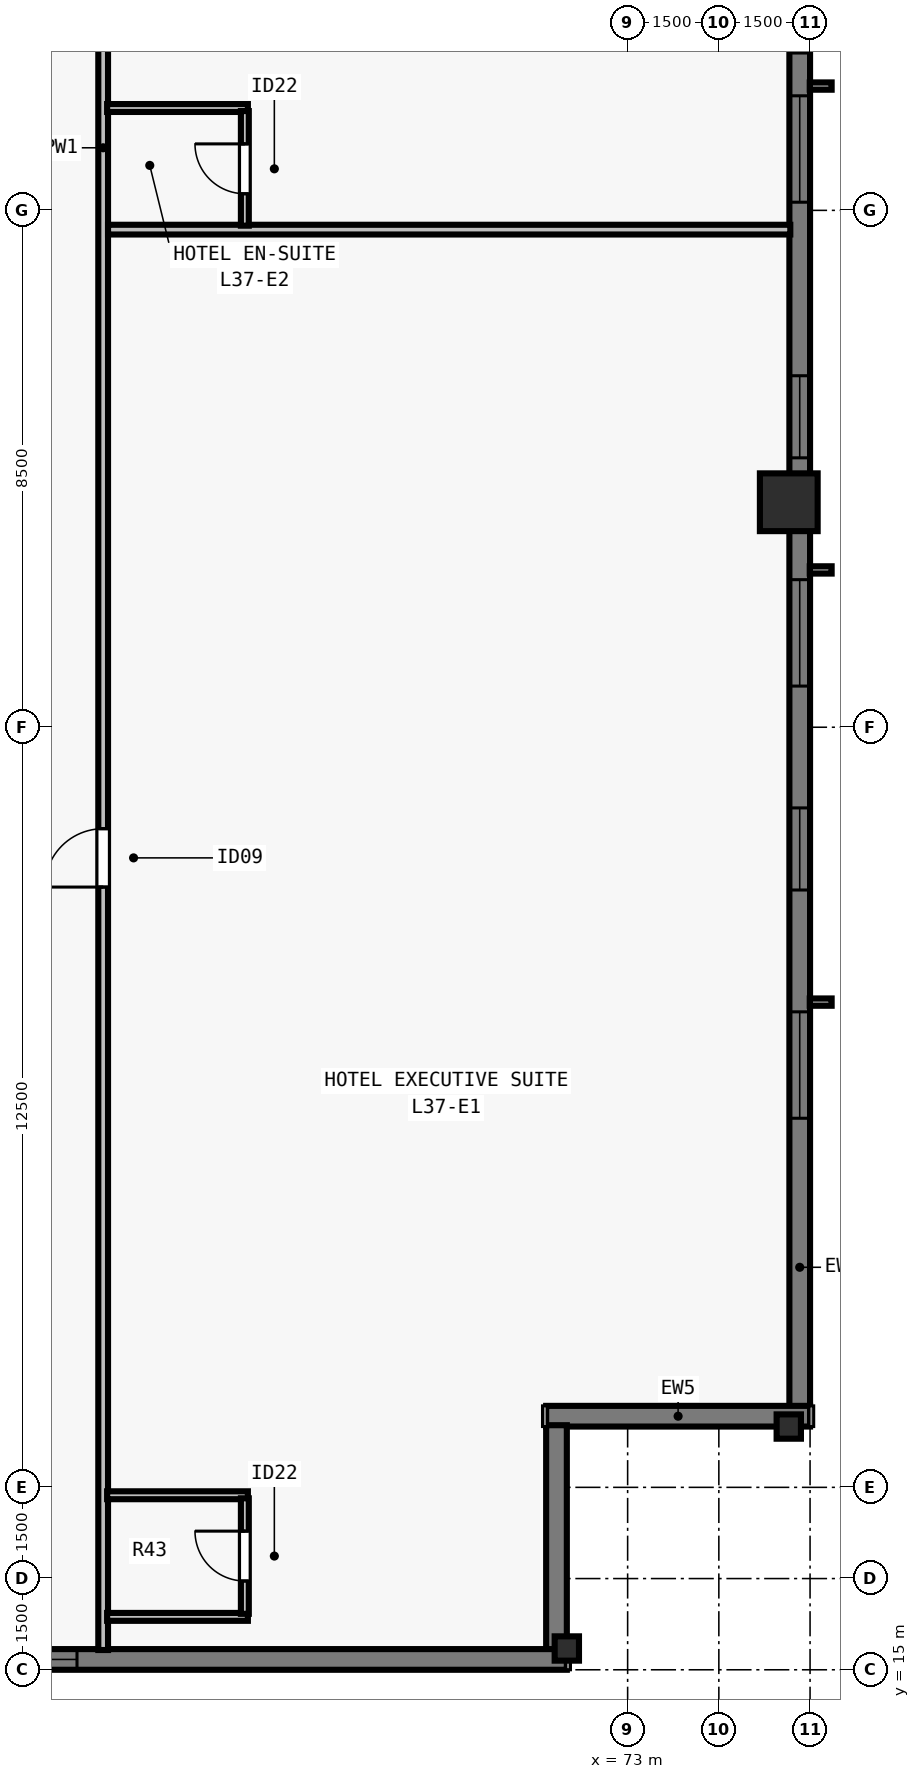
"""IFC4 building model, lengths in metres.
Left out: names, types, materials, properties, quantities, classifications, styles, units other than length and angle.
Written with IfcOpenShell. Run it as: python <this file> out.ifc"""

import sys

from ifc_helpers import new_model, si_unit, direction, frame, frame_2d, origin, origin_2d, place, context, subcontext, project, spatial, rectangle, i_section, extrude, element, fill, save


model = new_model("IFC4")
c1 = context("Model", 3, precision=1e-05, world=origin(), true_north=direction((0.0, 1.0)))
c2 = subcontext(c1, "Body", "Model", "MODEL_VIEW")
j1 = project(units=[si_unit("LENGTHUNIT", "METRE"), si_unit("PLANEANGLEUNIT", "RADIAN")], contexts=[c1])
p1 = place(None, origin())
s1 = spatial("IfcSite", under=j1, at=p1, CompositionType="ELEMENT")
p2 = place(p1, origin())
s2 = spatial("IfcBuilding", under=s1, at=p2, CompositionType="ELEMENT")
p3 = place(p2, frame((0.0, 0.0, 137.5)))
s3 = spatial("IfcBuildingStorey", under=s2, at=p3, CompositionType="ELEMENT", Elevation=137.5)
for number, where, z_axis, x_axis in (
    (1, (72.0, 15.35, 0.0), (0.0, 0.0, 1.0), (1.0, 0.0, 0.0)),
    (2, (75.65, 19.0, 0.0), (0.0, 0.0, 1.0), (0.0, 1.0, 0.0)),
):
    element("IfcColumn", number, at=place(p3, frame(where, z_axis=z_axis, x_axis=x_axis)), inside=s3, PredefinedType="COLUMN", context=c2, shape_type="SweptSolid", body=[
        extrude(i_section(OverallWidth=0.4, OverallDepth=0.4, WebThickness=0.022, FlangeThickness=0.036, at=origin_2d()), origin(), (0.0, 0.0, 1.0), 3.5),
    ])
p4 = place(p3, frame((75.65, 34.2, 0.0), z_axis=(0.0, 0.0, 1.0), x_axis=(0.0, 1.0, 0.0)))
e3 = element("IfcColumn", 3, at=p4, inside=s3, PredefinedType="COLUMN", context=c2, shape_type="SweptSolid", body=[
    extrude(rectangle(XDim=0.95, YDim=0.95, at=origin_2d()), origin(), (0.0, 0.0, 1.0), 3.5),
])
p5 = place(p3, frame((75.83, 59.0, 0.0), z_axis=(0.0, 0.0, 1.0), x_axis=(0.0, -1.0, 0.0)))
e4 = element("IfcWall", 4, at=p5, inside=s3, PredefinedType="SOLIDWALL", context=c2, shape_type="SweptSolid", body=[
    extrude(rectangle(XDim=39.682, YDim=0.34, at=frame_2d((19.841, 0.0))), origin(), (0.0, 0.0, 1.0), 3.28),
])
p6 = place(p5, frame((4.752, 0.0, 0.8)))
e5 = element("IfcOpeningElement", 5, at=p6, cuts=e4, PredefinedType="OPENING", context=c2, shape_type="SweptSolid", body=[
    extrude(rectangle(XDim=1.75, YDim=1.66, at=frame_2d((0.875, 0.83))), frame((0.0, 0.18, 0.0), z_axis=(0.0, -1.0, 0.0), x_axis=(1.0, 0.0, 0.0)), (0.0, 0.0, 1.0), 0.36),
])
p7 = place(p5, frame((8.505, 0.0, 0.8)))
e6 = element("IfcOpeningElement", 6, at=p7, cuts=e4, PredefinedType="OPENING", context=c2, shape_type="SweptSolid", body=[
    extrude(rectangle(XDim=1.35, YDim=1.66, at=frame_2d((0.675, 0.83))), frame((0.0, 0.18, 0.0), z_axis=(0.0, -1.0, 0.0), x_axis=(1.0, 0.0, 0.0)), (0.0, 0.0, 1.0), 0.36),
])
p8 = place(p5, frame((11.859, 0.0, 0.8)))
e7 = element("IfcOpeningElement", 7, at=p8, cuts=e4, PredefinedType="OPENING", context=c2, shape_type="SweptSolid", body=[
    extrude(rectangle(XDim=1.75, YDim=1.66, at=frame_2d((0.875, 0.83))), frame((0.0, 0.18, 0.0), z_axis=(0.0, -1.0, 0.0), x_axis=(1.0, 0.0, 0.0)), (0.0, 0.0, 1.0), 0.36),
])
p9 = place(p5, frame((16.062, 0.0, 0.8)))
e8 = element("IfcOpeningElement", 8, at=p9, cuts=e4, PredefinedType="OPENING", context=c2, shape_type="SweptSolid", body=[
    extrude(rectangle(XDim=1.35, YDim=1.66, at=frame_2d((0.675, 0.83))), frame((0.0, 0.18, 0.0), z_axis=(0.0, -1.0, 0.0), x_axis=(1.0, 0.0, 0.0)), (0.0, 0.0, 1.0), 0.36),
])
p10 = place(p5, frame((18.116, 0.0, 0.8)))
e9 = element("IfcOpeningElement", 9, at=p10, cuts=e4, PredefinedType="OPENING", context=c2, shape_type="SweptSolid", body=[
    extrude(rectangle(XDim=1.75, YDim=1.66, at=frame_2d((0.875, 0.83))), frame((0.0, 0.18, 0.0), z_axis=(0.0, -1.0, 0.0), x_axis=(1.0, 0.0, 0.0)), (0.0, 0.0, 1.0), 0.36),
])
p11 = place(p5, frame((22.719, 0.0, 0.8)))
e10 = element("IfcOpeningElement", 10, at=p11, cuts=e4, PredefinedType="OPENING", context=c2, shape_type="SweptSolid", body=[
    extrude(rectangle(XDim=1.35, YDim=1.66, at=frame_2d((0.675, 0.83))), frame((0.0, 0.18, 0.0), z_axis=(0.0, -1.0, 0.0), x_axis=(1.0, 0.0, 0.0)), (0.0, 0.0, 1.0), 0.36),
])
p12 = place(p5, frame((26.073, 0.0, 0.8)))
e11 = element("IfcOpeningElement", 11, at=p12, cuts=e4, PredefinedType="OPENING", context=c2, shape_type="SweptSolid", body=[
    extrude(rectangle(XDim=1.75, YDim=1.66, at=frame_2d((0.875, 0.83))), frame((0.0, 0.18, 0.0), z_axis=(0.0, -1.0, 0.0), x_axis=(1.0, 0.0, 0.0)), (0.0, 0.0, 1.0), 0.36),
])
p13 = place(p5, frame((29.827, 0.0, 0.8)))
e12 = element("IfcOpeningElement", 12, at=p13, cuts=e4, PredefinedType="OPENING", context=c2, shape_type="SweptSolid", body=[
    extrude(rectangle(XDim=1.35, YDim=1.66, at=frame_2d((0.675, 0.83))), frame((0.0, 0.18, 0.0), z_axis=(0.0, -1.0, 0.0), x_axis=(1.0, 0.0, 0.0)), (0.0, 0.0, 1.0), 0.36),
])
p14 = place(p5, frame((33.18, 0.0, 0.8)))
e13 = element("IfcOpeningElement", 13, at=p14, cuts=e4, PredefinedType="OPENING", context=c2, shape_type="SweptSolid", body=[
    extrude(rectangle(XDim=1.75, YDim=1.66, at=frame_2d((0.875, 0.83))), frame((0.0, 0.18, 0.0), z_axis=(0.0, -1.0, 0.0), x_axis=(1.0, 0.0, 0.0)), (0.0, 0.0, 1.0), 0.36),
])
p15 = place(p3, frame((76.0, 19.17, 0.0), z_axis=(0.0, 0.0, 1.0), x_axis=(-1.0, 0.0, 0.0)))
e14 = element("IfcWall", 14, at=p15, inside=s3, PredefinedType="SOLIDWALL", context=c2, shape_type="SweptSolid", body=[
    extrude(rectangle(XDim=4.34, YDim=0.34, at=frame_2d((2.17, 0.0))), origin(), (0.0, 0.0, 1.0), 3.28),
])
p16 = place(p3, frame((71.83, 19.022, 0.0), z_axis=(0.0, 0.0, 1.0), x_axis=(0.0, -1.0, 0.0)))
e15 = element("IfcWall", 15, at=p16, inside=s3, PredefinedType="SOLIDWALL", context=c2, shape_type="SweptSolid", body=[
    extrude(rectangle(XDim=3.704, YDim=0.34, at=frame_2d((1.852, 0.0))), origin(), (0.0, 0.0, 1.0), 3.28),
])
p17 = place(p3, frame((72.0, 15.17, 0.0), z_axis=(0.0, 0.0, 1.0), x_axis=(-1.0, 0.0, 0.0)))
e16 = element("IfcWall", 16, at=p17, inside=s3, PredefinedType="SOLIDWALL", context=c2, shape_type="SweptSolid", body=[
    extrude(rectangle(XDim=39.682, YDim=0.34, at=frame_2d((19.841, 0.0))), origin(), (0.0, 0.0, 1.0), 3.28),
])
p18 = place(p17, frame((8.055, 0.0, 0.8)))
e17 = element("IfcOpeningElement", 17, at=p18, cuts=e16, PredefinedType="OPENING", context=c2, shape_type="SweptSolid", body=[
    extrude(rectangle(XDim=1.35, YDim=1.66, at=frame_2d((0.675, 0.83))), frame((0.0, 0.18, 0.0), z_axis=(0.0, -1.0, 0.0), x_axis=(1.0, 0.0, 0.0)), (0.0, 0.0, 1.0), 0.36),
])
p19 = place(p17, frame((11.859, 0.0, 0.8)))
e18 = element("IfcOpeningElement", 18, at=p19, cuts=e16, PredefinedType="OPENING", context=c2, shape_type="SweptSolid", body=[
    extrude(rectangle(XDim=1.75, YDim=1.66, at=frame_2d((0.875, 0.83))), frame((0.0, 0.18, 0.0), z_axis=(0.0, -1.0, 0.0), x_axis=(1.0, 0.0, 0.0)), (0.0, 0.0, 1.0), 0.36),
])
p20 = place(p17, frame((16.062, 0.0, 0.8)))
e19 = element("IfcOpeningElement", 19, at=p20, cuts=e16, PredefinedType="OPENING", context=c2, shape_type="SweptSolid", body=[
    extrude(rectangle(XDim=1.35, YDim=1.66, at=frame_2d((0.675, 0.83))), frame((0.0, 0.18, 0.0), z_axis=(0.0, -1.0, 0.0), x_axis=(1.0, 0.0, 0.0)), (0.0, 0.0, 1.0), 0.36),
])
p21 = place(p17, frame((18.966, 0.0, 0.8)))
e20 = element("IfcOpeningElement", 20, at=p21, cuts=e16, PredefinedType="OPENING", context=c2, shape_type="SweptSolid", body=[
    extrude(rectangle(XDim=1.75, YDim=1.66, at=frame_2d((0.875, 0.83))), frame((0.0, 0.18, 0.0), z_axis=(0.0, -1.0, 0.0), x_axis=(1.0, 0.0, 0.0)), (0.0, 0.0, 1.0), 0.36),
])
p22 = place(p17, frame((22.719, 0.0, 0.8)))
e21 = element("IfcOpeningElement", 21, at=p22, cuts=e16, PredefinedType="OPENING", context=c2, shape_type="SweptSolid", body=[
    extrude(rectangle(XDim=1.35, YDim=1.66, at=frame_2d((0.675, 0.83))), frame((0.0, 0.18, 0.0), z_axis=(0.0, -1.0, 0.0), x_axis=(1.0, 0.0, 0.0)), (0.0, 0.0, 1.0), 0.36),
])
p23 = place(p17, frame((26.523, 0.0, 0.8)))
e22 = element("IfcOpeningElement", 22, at=p23, cuts=e16, PredefinedType="OPENING", context=c2, shape_type="SweptSolid", body=[
    extrude(rectangle(XDim=1.75, YDim=1.66, at=frame_2d((0.875, 0.83))), frame((0.0, 0.18, 0.0), z_axis=(0.0, -1.0, 0.0), x_axis=(1.0, 0.0, 0.0)), (0.0, 0.0, 1.0), 0.36),
])
p24 = place(p17, frame((29.827, 0.0, 0.8)))
e23 = element("IfcOpeningElement", 23, at=p24, cuts=e16, PredefinedType="OPENING", context=c2, shape_type="SweptSolid", body=[
    extrude(rectangle(XDim=1.35, YDim=1.66, at=frame_2d((0.675, 0.83))), frame((0.0, 0.18, 0.0), z_axis=(0.0, -1.0, 0.0), x_axis=(1.0, 0.0, 0.0)), (0.0, 0.0, 1.0), 0.36),
])
p25 = place(p3, frame((64.375, 15.325, 0.0), z_axis=(0.0, 0.0, 1.0), x_axis=(0.0, 1.0, 0.0)))
e24 = element("IfcWall", 24, at=p25, inside=s3, PredefinedType="PARTITIONING", context=c2, shape_type="SweptSolid", body=[
    extrude(rectangle(XDim=47.35, YDim=0.16, at=frame_2d((23.675, 0.0))), origin(), (0.0, 0.0, 1.0), 2.555),
])
p26 = place(p25, frame((12.547, 0.0, 0.0)))
e25 = element("IfcOpeningElement", 25, at=p26, cuts=e24, PredefinedType="OPENING", context=c2, shape_type="SweptSolid", body=[
    extrude(rectangle(XDim=0.96, YDim=2.15, at=frame_2d((0.48, 1.075))), frame((0.0, 0.09, 0.0), z_axis=(0.0, -1.0, 0.0), x_axis=(1.0, 0.0, 0.0)), (0.0, 0.0, 1.0), 0.18),
])
p27 = place(p25, frame((35.902, 0.0, 0.0)))
e26 = element("IfcOpeningElement", 26, at=p27, cuts=e24, PredefinedType="OPENING", context=c2, shape_type="SweptSolid", body=[
    extrude(rectangle(XDim=0.96, YDim=2.15, at=frame_2d((0.48, 1.075))), frame((0.0, 0.09, 0.0), z_axis=(0.0, -1.0, 0.0), x_axis=(1.0, 0.0, 0.0)), (0.0, 0.0, 1.0), 0.18),
])
for number, where, z_axis, x_axis in (
    (27, (64.44, 15.87, 0.0), (0.0, 0.0, 1.0), (1.0, 0.0, 0.0)),
    (28, (64.44, 17.87, 0.0), (0.0, 0.0, 1.0), (1.0, 0.0, 0.0)),
):
    element("IfcWall", number, at=place(p3, frame(where, z_axis=z_axis, x_axis=x_axis)), inside=s3, PredefinedType="PLUMBINGWALL", context=c2, shape_type="SweptSolid", body=[
        extrude(rectangle(XDim=2.315, YDim=0.13, at=frame_2d((1.157, 0.0))), origin(), (0.0, 0.0, 1.0), 3.28),
    ])
p28 = place(p3, frame((66.705, 15.92, 0.0), z_axis=(0.0, 0.0, 1.0), x_axis=(0.0, 1.0, 0.0)))
e29 = element("IfcWall", 29, at=p28, inside=s3, PredefinedType="PLUMBINGWALL", context=c2, shape_type="SweptSolid", body=[
    extrude(rectangle(XDim=1.9, YDim=0.13, at=frame_2d((0.95, 0.0))), origin(), (0.0, 0.0, 1.0), 3.28),
])
p29 = place(p28, frame((0.54, 0.0, 0.0)))
e30 = element("IfcOpeningElement", 30, at=p29, cuts=e29, PredefinedType="OPENING", context=c2, shape_type="SweptSolid", body=[
    extrude(rectangle(XDim=0.82, YDim=2.1, at=frame_2d((0.41, 1.05))), frame((0.0, 0.075, 0.0), z_axis=(0.0, -1.0, 0.0), x_axis=(1.0, 0.0, 0.0)), (0.0, 0.0, 1.0), 0.15),
])
p30 = place(p3, frame((64.455, 38.683, 0.0), z_axis=(0.0, 0.0, 1.0), x_axis=(1.0, 0.0, 0.0)))
e31 = element("IfcWall", 31, at=p30, inside=s3, PredefinedType="PARTITIONING", context=c2, shape_type="SweptSolid", body=[
    extrude(rectangle(XDim=11.22, YDim=0.16, at=frame_2d((5.61, 0.0))), origin(), (0.0, 0.0, 1.0), 3.28),
])
p31 = place(p3, frame((64.44, 40.683, 0.0), z_axis=(0.0, 0.0, 1.0), x_axis=(1.0, 0.0, 0.0)))
e32 = element("IfcWall", 32, at=p31, inside=s3, PredefinedType="PLUMBINGWALL", context=c2, shape_type="SweptSolid", body=[
    extrude(rectangle(XDim=2.315, YDim=0.13, at=frame_2d((1.157, 0.0))), origin(), (0.0, 0.0, 1.0), 3.28),
])
p32 = place(p3, frame((66.705, 38.748, 0.0), z_axis=(0.0, 0.0, 1.0), x_axis=(0.0, 1.0, 0.0)))
e33 = element("IfcWall", 33, at=p32, inside=s3, PredefinedType="PLUMBINGWALL", context=c2, shape_type="SweptSolid", body=[
    extrude(rectangle(XDim=1.885, YDim=0.13, at=frame_2d((0.942, 0.0))), origin(), (0.0, 0.0, 1.0), 3.28),
])
p33 = place(p32, frame((0.525, 0.0, 0.0)))
e34 = element("IfcOpeningElement", 34, at=p33, cuts=e33, PredefinedType="OPENING", context=c2, shape_type="SweptSolid", body=[
    extrude(rectangle(XDim=0.82, YDim=2.1, at=frame_2d((0.41, 1.05))), frame((0.0, 0.075, 0.0), z_axis=(0.0, -1.0, 0.0), x_axis=(1.0, 0.0, 0.0)), (0.0, 0.0, 1.0), 0.15),
])
p34 = place(p9, origin())
e35 = element("IfcWindow", 35, at=p34, inside=s3, PartitioningType="SINGLE_PANEL", PredefinedType="WINDOW", context=c2, shape_type="SweptSolid", body=[
    extrude(rectangle(XDim=1.35, YDim=1.66, at=frame_2d((0.675, 0.83))), frame((0.0, -0.05, 0.0), z_axis=(0.0, -1.0, 0.0), x_axis=(1.0, 0.0, 0.0)), (0.0, 0.0, 1.0), 0.06),
])
fill(e8, e35)
p35 = place(p10, origin())
e36 = element("IfcWindow", 36, at=p35, inside=s3, PartitioningType="SINGLE_PANEL", PredefinedType="WINDOW", context=c2, shape_type="SweptSolid", body=[
    extrude(rectangle(XDim=1.75, YDim=1.66, at=frame_2d((0.875, 0.83))), frame((0.0, -0.05, 0.0), z_axis=(0.0, -1.0, 0.0), x_axis=(1.0, 0.0, 0.0)), (0.0, 0.0, 1.0), 0.06),
])
fill(e9, e36)
p36 = place(p11, origin())
e37 = element("IfcWindow", 37, at=p36, inside=s3, PartitioningType="SINGLE_PANEL", PredefinedType="WINDOW", context=c2, shape_type="SweptSolid", body=[
    extrude(rectangle(XDim=1.35, YDim=1.66, at=frame_2d((0.675, 0.83))), frame((0.0, -0.05, 0.0), z_axis=(0.0, -1.0, 0.0), x_axis=(1.0, 0.0, 0.0)), (0.0, 0.0, 1.0), 0.06),
])
fill(e10, e37)
p37 = place(p12, origin())
e38 = element("IfcWindow", 38, at=p37, inside=s3, PartitioningType="SINGLE_PANEL", PredefinedType="WINDOW", context=c2, shape_type="SweptSolid", body=[
    extrude(rectangle(XDim=1.75, YDim=1.66, at=frame_2d((0.875, 0.83))), frame((0.0, -0.05, 0.0), z_axis=(0.0, -1.0, 0.0), x_axis=(1.0, 0.0, 0.0)), (0.0, 0.0, 1.0), 0.06),
])
fill(e11, e38)
p38 = place(p13, origin())
e39 = element("IfcWindow", 39, at=p38, inside=s3, PartitioningType="SINGLE_PANEL", PredefinedType="WINDOW", context=c2, shape_type="SweptSolid", body=[
    extrude(rectangle(XDim=1.35, YDim=1.66, at=frame_2d((0.675, 0.83))), frame((0.0, -0.05, 0.0), z_axis=(0.0, -1.0, 0.0), x_axis=(1.0, 0.0, 0.0)), (0.0, 0.0, 1.0), 0.06),
])
fill(e12, e39)
p39 = place(p14, origin())
e40 = element("IfcWindow", 40, at=p39, inside=s3, PartitioningType="SINGLE_PANEL", PredefinedType="WINDOW", context=c2, shape_type="SweptSolid", body=[
    extrude(rectangle(XDim=1.75, YDim=1.66, at=frame_2d((0.875, 0.83))), frame((0.0, -0.05, 0.0), z_axis=(0.0, -1.0, 0.0), x_axis=(1.0, 0.0, 0.0)), (0.0, 0.0, 1.0), 0.06),
])
fill(e13, e40)
p40 = place(p18, origin())
e41 = element("IfcWindow", 41, at=p40, inside=s3, PartitioningType="SINGLE_PANEL", PredefinedType="WINDOW", context=c2, shape_type="SweptSolid", body=[
    extrude(rectangle(XDim=1.35, YDim=1.66, at=frame_2d((0.675, 0.83))), frame((0.0, -0.05, 0.0), z_axis=(0.0, -1.0, 0.0), x_axis=(1.0, 0.0, 0.0)), (0.0, 0.0, 1.0), 0.06),
])
fill(e17, e41)
p41 = place(p29, origin())
e42 = element("IfcDoor", 42, at=p41, inside=s3, OperationType="SINGLE_SWING_RIGHT", PredefinedType="DOOR", context=c2, shape_type="SweptSolid", body=[
    extrude(rectangle(XDim=0.82, YDim=2.1, at=frame_2d((0.41, 1.05))), frame((0.0, 0.025, 0.0), z_axis=(0.0, -1.0, 0.0), x_axis=(1.0, 0.0, 0.0)), (0.0, 0.0, 1.0), 0.05),
])
fill(e30, e42)
p42 = place(p26, origin())
e43 = element("IfcDoor", 43, at=p42, inside=s3, OperationType="SINGLE_SWING_LEFT", PredefinedType="DOOR", context=c2, shape_type="SweptSolid", body=[
    extrude(rectangle(XDim=0.96, YDim=2.15, at=frame_2d((0.48, 1.075))), frame((0.0, 0.025, 0.0), z_axis=(0.0, -1.0, 0.0), x_axis=(1.0, 0.0, 0.0)), (0.0, 0.0, 1.0), 0.05),
])
fill(e25, e43)
p43 = place(p33, origin())
e44 = element("IfcDoor", 44, at=p43, inside=s3, OperationType="SINGLE_SWING_RIGHT", PredefinedType="DOOR", context=c2, shape_type="SweptSolid", body=[
    extrude(rectangle(XDim=0.82, YDim=2.1, at=frame_2d((0.41, 1.05))), frame((0.0, 0.025, 0.0), z_axis=(0.0, -1.0, 0.0), x_axis=(1.0, 0.0, 0.0)), (0.0, 0.0, 1.0), 0.05),
])
fill(e34, e44)
save(model, sys.argv[1])
